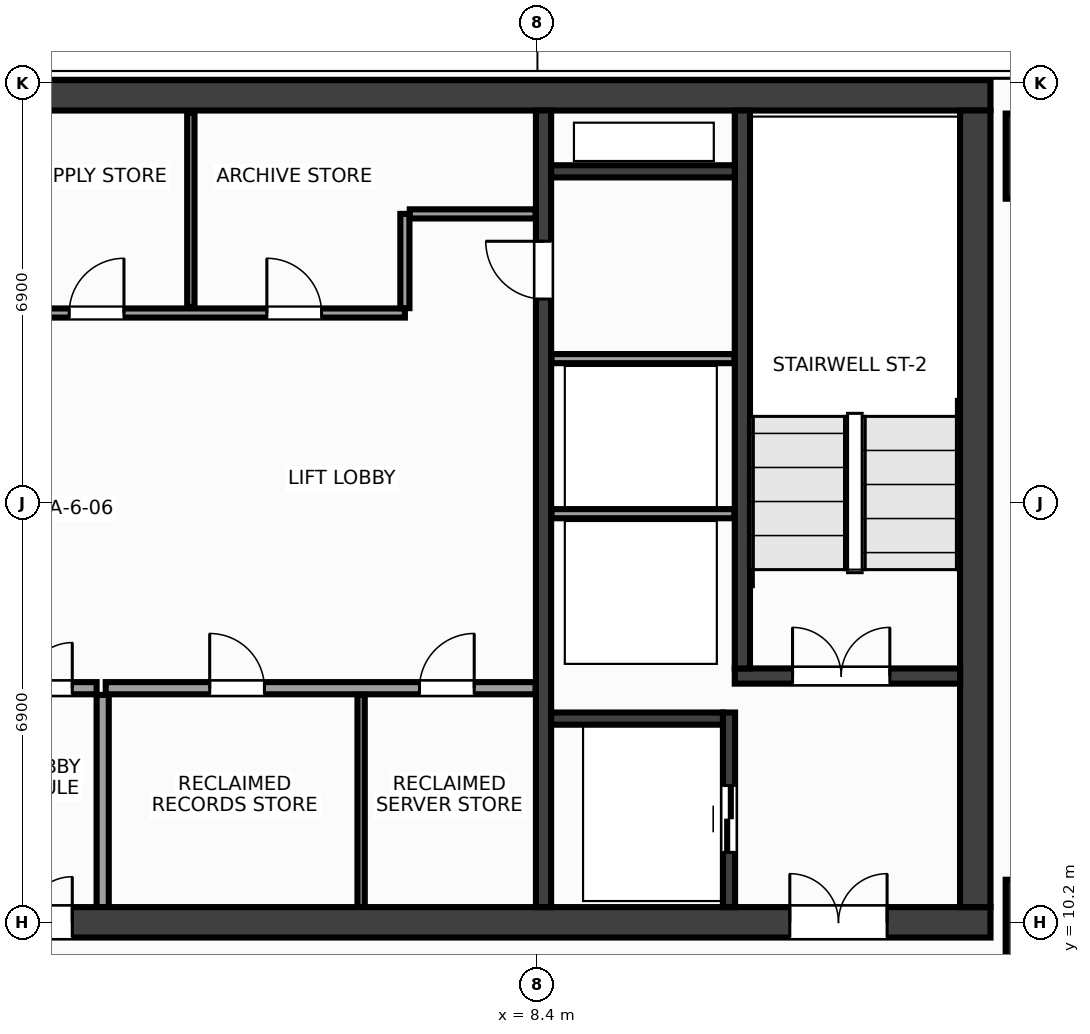
"""IFC4 building model, lengths in metres.
Left out: names, types, materials, properties, quantities, classifications, styles, units other than length and angle.
Written with IfcOpenShell. Run it as: python <this file> out.ifc"""

import sys

from ifc_helpers import new_model, si_unit, direction, frame, frame_2d, origin, origin_2d, place, context, subcontext, project, spatial, rectangle, extrude, source, transform, mapped, element, fill, save


model = new_model("IFC4")
c1 = context("Model", 3, precision=1e-05, world=origin(), true_north=direction((0.0, 1.0)))
c2 = subcontext(c1, "Body", "Model", "MODEL_VIEW")
j1 = project(units=[si_unit("LENGTHUNIT", "METRE"), si_unit("PLANEANGLEUNIT", "RADIAN")], contexts=[c1])
p1 = place(None, origin())
s1 = spatial("IfcSite", under=j1, at=p1, CompositionType="ELEMENT")
p2 = place(p1, origin())
s2 = spatial("IfcBuilding", under=s1, at=p2, CompositionType="ELEMENT")
p3 = place(p2, frame((0.0, 0.0, 261.2)))
s3 = spatial("IfcBuildingStorey", under=s2, at=p3, CompositionType="ELEMENT", Elevation=261.2)
m1 = source(origin(), c2, "Body", "SweptSolid", [
    extrude(rectangle(XDim=31.7, YDim=0.5, at=frame_2d((15.85, 0.0))), origin(), (0.0, 0.0, 1.0), 3.6),
])
p4 = place(p3, frame((-15.85, 23.8, 0.0), z_axis=(0.0, 0.0, 1.0), x_axis=(1.0, 0.0, 0.0)))
e1 = element("IfcWall", 1, at=p4, inside=s3, PredefinedType="SHEAR", context=c2, shape_type="MappedRepresentation", body=[
    mapped(m1, transform((0.0, 0.0, 0.0), x_axis=(1.0, 0.0, 0.0), y_axis=(0.0, 1.0, 0.0), z_axis=(0.0, 0.0, 1.0), scale=1.0)),
])
p5 = place(p3, frame((-15.85, 10.2, 0.0), z_axis=(0.0, 0.0, 1.0), x_axis=(1.0, 0.0, 0.0)))
e2 = element("IfcWall", 2, at=p5, inside=s3, PredefinedType="SHEAR", context=c2, shape_type="MappedRepresentation", body=[
    mapped(m1, transform((0.0, 0.0, 0.0), x_axis=(1.0, 0.0, 0.0), y_axis=(0.0, 1.0, 0.0), z_axis=(0.0, 0.0, 1.0), scale=1.0)),
])
p6 = place(p5, frame((1.7, 0.0, 0.0)))
e3 = element("IfcOpeningElement", 3, at=p6, cuts=e2, PredefinedType="OPENING", context=c2, shape_type="SweptSolid", body=[
    extrude(rectangle(XDim=1.6, YDim=2.15, at=frame_2d((0.8, 1.075))), frame((0.0, 0.262, 0.0), z_axis=(0.0, -1.0, 0.0), x_axis=(1.0, 0.0, 0.0)), (0.0, 0.0, 1.0), 0.524),
])
p7 = place(p5, frame((28.4, 0.0, 0.0)))
e4 = element("IfcOpeningElement", 4, at=p7, cuts=e2, PredefinedType="OPENING", context=c2, shape_type="SweptSolid", body=[
    extrude(rectangle(XDim=1.6, YDim=2.15, at=frame_2d((0.8, 1.075))), frame((0.0, 0.262, 0.0), z_axis=(0.0, -1.0, 0.0), x_axis=(1.0, 0.0, 0.0)), (0.0, 0.0, 1.0), 0.524),
])
p8 = place(p5, frame((15.1, 0.0, 0.0)))
e5 = element("IfcOpeningElement", 5, at=p8, cuts=e2, PredefinedType="OPENING", context=c2, shape_type="SweptSolid", body=[
    extrude(rectangle(XDim=1.5, YDim=2.2, at=frame_2d((0.75, 1.1))), frame((0.0, 0.262, 0.0), z_axis=(0.0, -1.0, 0.0), x_axis=(1.0, 0.0, 0.0)), (0.0, 0.0, 1.0), 0.524),
])
m2 = source(origin(), c2, "Body", "SweptSolid", [
    extrude(rectangle(XDim=13.1, YDim=0.5, at=frame_2d((6.55, 0.0))), origin(), (0.0, 0.0, 1.0), 3.6),
])
p9 = place(p3, frame((15.6, 10.45, 0.0), z_axis=(0.0, 0.0, 1.0), x_axis=(0.0, 1.0, 0.0)))
e6 = element("IfcWall", 6, at=p9, inside=s3, PredefinedType="SHEAR", context=c2, shape_type="MappedRepresentation", body=[
    mapped(m2, transform((0.0, 0.0, 0.0), x_axis=(1.0, 0.0, 0.0), y_axis=(0.0, 1.0, 0.0), z_axis=(0.0, 0.0, 1.0), scale=1.0)),
])
m3 = source(origin(), c2, "Body", "SweptSolid", [
    extrude(rectangle(XDim=13.1, YDim=0.25, at=frame_2d((6.55, 0.0))), origin(), (0.0, 0.0, 1.0), 3.6),
])
p10 = place(p3, frame((8.5, 10.45, 0.0), z_axis=(0.0, 0.0, 1.0), x_axis=(0.0, 1.0, 0.0)))
e7 = element("IfcWall", 7, at=p10, inside=s3, PredefinedType="SHEAR", context=c2, shape_type="MappedRepresentation", body=[
    mapped(m3, transform((0.0, 0.0, 0.0), x_axis=(1.0, 0.0, 0.0), y_axis=(0.0, 1.0, 0.0), z_axis=(0.0, 0.0, 1.0), scale=1.0)),
])
p11 = place(p10, frame((10.0, 0.0, 0.0)))
e8 = element("IfcOpeningElement", 8, at=p11, cuts=e7, PredefinedType="OPENING", context=c2, shape_type="SweptSolid", body=[
    extrude(rectangle(XDim=0.95, YDim=2.15, at=frame_2d((0.475, 1.075))), frame((0.0, 0.137, 0.0), z_axis=(0.0, -1.0, 0.0), x_axis=(1.0, 0.0, 0.0)), (0.0, 0.0, 1.0), 0.274),
])
m4 = source(origin(), c2, "Body", "SweptSolid", [
    extrude(rectangle(XDim=3.705, YDim=0.25, at=frame_2d((1.853, 0.0))), origin(), (0.0, 0.0, 1.0), 3.6),
])
p12 = place(p3, frame((11.645, 14.25, 0.0), z_axis=(0.0, 0.0, 1.0), x_axis=(1.0, 0.0, 0.0)))
e9 = element("IfcWall", 9, at=p12, inside=s3, PredefinedType="SHEAR", context=c2, shape_type="MappedRepresentation", body=[
    mapped(m4, transform((0.0, 0.0, 0.0), x_axis=(1.0, 0.0, 0.0), y_axis=(0.0, 1.0, 0.0), z_axis=(0.0, 0.0, 1.0), scale=1.0)),
])
p13 = place(p12, frame((0.95, 0.0, 0.0)))
e10 = element("IfcOpeningElement", 10, at=p13, cuts=e9, PredefinedType="OPENING", context=c2, shape_type="SweptSolid", body=[
    extrude(rectangle(XDim=1.6, YDim=2.15, at=frame_2d((0.8, 1.075))), frame((0.0, 0.137, 0.0), z_axis=(0.0, -1.0, 0.0), x_axis=(1.0, 0.0, 0.0)), (0.0, 0.0, 1.0), 0.274),
])
m5 = source(origin(), c2, "Body", "SweptSolid", [
    extrude(rectangle(XDim=9.175, YDim=0.25, at=frame_2d((4.587, 0.0))), origin(), (0.0, 0.0, 1.0), 3.6),
])
p14 = place(p3, frame((11.77, 14.375, 0.0), z_axis=(0.0, 0.0, 1.0), x_axis=(0.0, 1.0, 0.0)))
e11 = element("IfcWall", 11, at=p14, inside=s3, PredefinedType="SHEAR", context=c2, shape_type="MappedRepresentation", body=[
    mapped(m5, transform((0.0, 0.0, 0.0), x_axis=(1.0, 0.0, 0.0), y_axis=(0.0, 1.0, 0.0), z_axis=(0.0, 0.0, 1.0), scale=1.0)),
])
m6 = source(origin(), c2, "Body", "SweptSolid", [
    extrude(rectangle(XDim=3.2, YDim=0.2, at=frame_2d((1.6, 0.0))), origin(), (0.0, 0.0, 1.0), 3.6),
])
p15 = place(p3, frame((11.55, 10.45, 0.0), z_axis=(0.0, 0.0, 1.0), x_axis=(0.0, 1.0, 0.0)))
e12 = element("IfcWall", 12, at=p15, inside=s3, PredefinedType="SHEAR", context=c2, shape_type="MappedRepresentation", body=[
    mapped(m6, transform((0.0, 0.0, 0.0), x_axis=(1.0, 0.0, 0.0), y_axis=(0.0, 1.0, 0.0), z_axis=(0.0, 0.0, 1.0), scale=1.0)),
])
p16 = place(p15, frame((0.9, 0.0, 0.0)))
e13 = element("IfcOpeningElement", 13, at=p16, cuts=e12, PredefinedType="OPENING", context=c2, shape_type="SweptSolid", body=[
    extrude(rectangle(XDim=1.1, YDim=2.15, at=frame_2d((0.55, 1.075))), frame((0.0, 0.112, 0.0), z_axis=(0.0, -1.0, 0.0), x_axis=(1.0, 0.0, 0.0)), (0.0, 0.0, 1.0), 0.224),
])
m7 = source(origin(), c2, "Body", "SweptSolid", [
    extrude(rectangle(XDim=2.825, YDim=0.2, at=frame_2d((1.413, 0.0))), origin(), (0.0, 0.0, 1.0), 3.6),
])
p17 = place(p3, frame((8.625, 13.55, 0.0), z_axis=(0.0, 0.0, 1.0), x_axis=(1.0, 0.0, 0.0)))
e14 = element("IfcWall", 14, at=p17, inside=s3, PredefinedType="SHEAR", context=c2, shape_type="MappedRepresentation", body=[
    mapped(m7, transform((0.0, 0.0, 0.0), x_axis=(1.0, 0.0, 0.0), y_axis=(0.0, 1.0, 0.0), z_axis=(0.0, 0.0, 1.0), scale=1.0)),
])
m8 = source(origin(), c2, "Body", "SweptSolid", [
    extrude(rectangle(XDim=3.02, YDim=0.2, at=frame_2d((1.51, 0.0))), origin(), (0.0, 0.0, 1.0), 3.6),
])
p18 = place(p3, frame((8.625, 22.55, 0.0), z_axis=(0.0, 0.0, 1.0), x_axis=(1.0, 0.0, 0.0)))
e15 = element("IfcWall", 15, at=p18, inside=s3, PredefinedType="SHEAR", context=c2, shape_type="MappedRepresentation", body=[
    mapped(m8, transform((0.0, 0.0, 0.0), x_axis=(1.0, 0.0, 0.0), y_axis=(0.0, 1.0, 0.0), z_axis=(0.0, 0.0, 1.0), scale=1.0)),
])
m9 = source(origin(), c2, "Body", "SweptSolid", [
    extrude(rectangle(XDim=1.4, YDim=1.4, at=origin_2d()), origin(), (0.0, 0.0, 1.0), 3.6),
])
for number, where, z_axis, x_axis in (
    (16, (16.8, 10.2, 0.0), (0.0, 0.0, 1.0), (1.0, 0.0, 0.0)),
    (17, (16.8, 22.8, 0.0), (0.0, 0.0, 1.0), (1.0, 0.0, 0.0)),
):
    element("IfcColumn", number, at=place(p3, frame(where, z_axis=z_axis, x_axis=x_axis)), inside=s3, PredefinedType="COLUMN", context=c2, shape_type="MappedRepresentation", body=[
        mapped(m9, transform((0.0, 0.0, 0.0), x_axis=(1.0, 0.0, 0.0), y_axis=(0.0, 1.0, 0.0), z_axis=(0.0, 0.0, 1.0), scale=1.0)),
    ])
m10 = source(origin(), c2, "Body", "SweptSolid", [
    extrude(rectangle(XDim=3.01, YDim=0.15, at=frame_2d((1.505, 0.0))), origin(), (0.0, 0.0, 1.0), 3.37),
])
for number, where, z_axis, x_axis in (
    (18, (8.63, 16.92, 0.0), (0.0, 0.0, 1.0), (1.0, 0.0, 0.0)),
    (19, (8.63, 19.47, 0.0), (0.0, 0.0, 1.0), (1.0, 0.0, 0.0)),
):
    element("IfcWall", number, at=place(p3, frame(where, z_axis=z_axis, x_axis=x_axis)), inside=s3, PredefinedType="PARTITIONING", context=c2, shape_type="MappedRepresentation", body=[
        mapped(m10, transform((0.0, 0.0, 0.0), x_axis=(1.0, 0.0, 0.0), y_axis=(0.0, 1.0, 0.0), z_axis=(0.0, 0.0, 1.0), scale=1.0)),
    ])
m11 = source(origin(), c2, "Body", "SweptSolid", [
    extrude(rectangle(XDim=7.07, YDim=0.2, at=frame_2d((3.535, 0.0))), origin(), (0.0, 0.0, 1.0), 3.37),
])
p19 = place(p3, frame((1.3, 14.05, 0.0), z_axis=(0.0, 0.0, 1.0), x_axis=(1.0, 0.0, 0.0)))
e20 = element("IfcWall", 20, at=p19, inside=s3, PredefinedType="PARTITIONING", context=c2, shape_type="MappedRepresentation", body=[
    mapped(m11, transform((0.0, 0.0, 0.0), x_axis=(1.0, 0.0, 0.0), y_axis=(0.0, 1.0, 0.0), z_axis=(0.0, 0.0, 1.0), scale=1.0)),
])
p20 = place(p19, frame((1.71, 0.0, 0.0)))
e21 = element("IfcOpeningElement", 21, at=p20, cuts=e20, PredefinedType="OPENING", context=c2, shape_type="SweptSolid", body=[
    extrude(rectangle(XDim=0.9, YDim=2.15, at=frame_2d((0.45, 1.075))), frame((0.0, 0.112, 0.0), z_axis=(0.0, -1.0, 0.0), x_axis=(1.0, 0.0, 0.0)), (0.0, 0.0, 1.0), 0.224),
])
p21 = place(p19, frame((5.16, 0.0, 0.0)))
e22 = element("IfcOpeningElement", 22, at=p21, cuts=e20, PredefinedType="OPENING", context=c2, shape_type="SweptSolid", body=[
    extrude(rectangle(XDim=0.9, YDim=2.15, at=frame_2d((0.45, 1.075))), frame((0.0, 0.112, 0.0), z_axis=(0.0, -1.0, 0.0), x_axis=(1.0, 0.0, 0.0)), (0.0, 0.0, 1.0), 0.224),
])
m12 = source(origin(), c2, "Body", "SweptSolid", [
    extrude(rectangle(XDim=3.49, YDim=0.2, at=frame_2d((1.745, 0.0))), origin(), (0.0, 0.0, 1.0), 3.37),
])
p22 = place(p3, frame((1.25, 10.45, 0.0), z_axis=(0.0, 0.0, 1.0), x_axis=(0.0, 1.0, 0.0)))
e23 = element("IfcWall", 23, at=p22, inside=s3, PredefinedType="PARTITIONING", context=c2, shape_type="MappedRepresentation", body=[
    mapped(m12, transform((0.0, 0.0, 0.0), x_axis=(1.0, 0.0, 0.0), y_axis=(0.0, 1.0, 0.0), z_axis=(0.0, 0.0, 1.0), scale=1.0)),
])
m13 = source(origin(), c2, "Body", "SweptSolid", [
    extrude(rectangle(XDim=2.3, YDim=0.2, at=frame_2d((1.15, 0.0))), origin(), (0.0, 0.0, 1.0), 3.37),
])
p23 = place(p3, frame((-1.15, 14.05, 0.0), z_axis=(0.0, 0.0, 1.0), x_axis=(1.0, 0.0, 0.0)))
e24 = element("IfcWall", 24, at=p23, inside=s3, PredefinedType="PARTITIONING", context=c2, shape_type="MappedRepresentation", body=[
    mapped(m13, transform((0.0, 0.0, 0.0), x_axis=(1.0, 0.0, 0.0), y_axis=(0.0, 1.0, 0.0), z_axis=(0.0, 0.0, 1.0), scale=1.0)),
])
p24 = place(p23, frame((0.4, 0.0, 0.0)))
e25 = element("IfcOpeningElement", 25, at=p24, cuts=e24, PredefinedType="OPENING", context=c2, shape_type="SweptSolid", body=[
    extrude(rectangle(XDim=1.5, YDim=2.2, at=frame_2d((0.75, 1.1))), frame((0.0, 0.112, 0.0), z_axis=(0.0, -1.0, 0.0), x_axis=(1.0, 0.0, 0.0)), (0.0, 0.0, 1.0), 0.224),
])
m14 = source(origin(), c2, "Body", "SweptSolid", [
    extrude(rectangle(XDim=14.59, YDim=0.15, at=frame_2d((7.295, 0.0))), origin(), (0.0, 0.0, 1.0), 3.37),
])
p25 = place(p3, frame((-8.37, 20.22, 0.0), z_axis=(0.0, 0.0, 1.0), x_axis=(1.0, 0.0, 0.0)))
e26 = element("IfcWall", 26, at=p25, inside=s3, PredefinedType="PARTITIONING", context=c2, shape_type="MappedRepresentation", body=[
    mapped(m14, transform((0.0, 0.0, 0.0), x_axis=(1.0, 0.0, 0.0), y_axis=(0.0, 1.0, 0.0), z_axis=(0.0, 0.0, 1.0), scale=1.0)),
])
p26 = place(p25, frame((0.86, 0.0, 0.0)))
e27 = element("IfcOpeningElement", 27, at=p26, cuts=e26, PredefinedType="OPENING", context=c2, shape_type="SweptSolid", body=[
    extrude(rectangle(XDim=0.9, YDim=2.15, at=frame_2d((0.45, 1.075))), frame((0.0, 0.087, 0.0), z_axis=(0.0, -1.0, 0.0), x_axis=(1.0, 0.0, 0.0)), (0.0, 0.0, 1.0), 0.174),
])
p27 = place(p25, frame((3.47, 0.0, 0.0)))
e28 = element("IfcOpeningElement", 28, at=p27, cuts=e26, PredefinedType="OPENING", context=c2, shape_type="SweptSolid", body=[
    extrude(rectangle(XDim=0.9, YDim=2.15, at=frame_2d((0.45, 1.075))), frame((0.0, 0.087, 0.0), z_axis=(0.0, -1.0, 0.0), x_axis=(1.0, 0.0, 0.0)), (0.0, 0.0, 1.0), 0.174),
])
p28 = place(p25, frame((6.17, 0.0, 0.0)))
e29 = element("IfcOpeningElement", 29, at=p28, cuts=e26, PredefinedType="OPENING", context=c2, shape_type="SweptSolid", body=[
    extrude(rectangle(XDim=0.9, YDim=2.15, at=frame_2d((0.45, 1.075))), frame((0.0, 0.087, 0.0), z_axis=(0.0, -1.0, 0.0), x_axis=(1.0, 0.0, 0.0)), (0.0, 0.0, 1.0), 0.174),
])
p29 = place(p25, frame((9.07, 0.0, 0.0)))
e30 = element("IfcOpeningElement", 30, at=p29, cuts=e26, PredefinedType="OPENING", context=c2, shape_type="SweptSolid", body=[
    extrude(rectangle(XDim=0.9, YDim=2.15, at=frame_2d((0.45, 1.075))), frame((0.0, 0.087, 0.0), z_axis=(0.0, -1.0, 0.0), x_axis=(1.0, 0.0, 0.0)), (0.0, 0.0, 1.0), 0.174),
])
p30 = place(p25, frame((12.32, 0.0, 0.0)))
e31 = element("IfcOpeningElement", 31, at=p30, cuts=e26, PredefinedType="OPENING", context=c2, shape_type="SweptSolid", body=[
    extrude(rectangle(XDim=0.9, YDim=2.15, at=frame_2d((0.45, 1.075))), frame((0.0, 0.087, 0.0), z_axis=(0.0, -1.0, 0.0), x_axis=(1.0, 0.0, 0.0)), (0.0, 0.0, 1.0), 0.174),
])
m15 = source(origin(), c2, "Body", "SweptSolid", [
    extrude(rectangle(XDim=1.55, YDim=0.15, at=frame_2d((0.775, 0.0))), origin(), (0.0, 0.0, 1.0), 3.37),
])
p31 = place(p3, frame((6.22, 20.3, 0.0), z_axis=(0.0, 0.0, 1.0), x_axis=(0.0, 1.0, 0.0)))
e32 = element("IfcWall", 32, at=p31, inside=s3, PredefinedType="PARTITIONING", context=c2, shape_type="MappedRepresentation", body=[
    mapped(m15, transform((0.0, 0.0, 0.0), x_axis=(1.0, 0.0, 0.0), y_axis=(0.0, 1.0, 0.0), z_axis=(0.0, 0.0, 1.0), scale=1.0)),
])
m16 = source(origin(), c2, "Body", "SweptSolid", [
    extrude(rectangle(XDim=2.07, YDim=0.15, at=frame_2d((1.035, 0.0))), origin(), (0.0, 0.0, 1.0), 3.37),
])
p32 = place(p3, frame((6.3, 21.85, 0.0), z_axis=(0.0, 0.0, 1.0), x_axis=(1.0, 0.0, 0.0)))
e33 = element("IfcWall", 33, at=p32, inside=s3, PredefinedType="PARTITIONING", context=c2, shape_type="MappedRepresentation", body=[
    mapped(m16, transform((0.0, 0.0, 0.0), x_axis=(1.0, 0.0, 0.0), y_axis=(0.0, 1.0, 0.0), z_axis=(0.0, 0.0, 1.0), scale=1.0)),
])
m17 = source(origin(), c2, "Body", "SweptSolid", [
    extrude(rectangle(XDim=3.49, YDim=0.12, at=frame_2d((1.745, 0.0))), origin(), (0.0, 0.0, 1.0), 3.37),
])
p33 = place(p3, frame((5.5, 10.45, 0.0), z_axis=(0.0, 0.0, 1.0), x_axis=(0.0, 1.0, 0.0)))
e34 = element("IfcWall", 34, at=p33, inside=s3, PredefinedType="PARTITIONING", context=c2, shape_type="MappedRepresentation", body=[
    mapped(m17, transform((0.0, 0.0, 0.0), x_axis=(1.0, 0.0, 0.0), y_axis=(0.0, 1.0, 0.0), z_axis=(0.0, 0.0, 1.0), scale=1.0)),
])
m18 = source(origin(), c2, "Body", "SweptSolid", [
    extrude(rectangle(XDim=3.19, YDim=0.12, at=frame_2d((1.595, 0.0))), origin(), (0.0, 0.0, 1.0), 3.37),
])
p34 = place(p3, frame((2.7, 20.32, 0.0), z_axis=(0.0, 0.0, 1.0), x_axis=(0.0, 1.0, 0.0)))
e35 = element("IfcWall", 35, at=p34, inside=s3, PredefinedType="PARTITIONING", context=c2, shape_type="MappedRepresentation", body=[
    mapped(m18, transform((0.0, 0.0, 0.0), x_axis=(1.0, 0.0, 0.0), y_axis=(0.0, 1.0, 0.0), z_axis=(0.0, 0.0, 1.0), scale=1.0)),
])
m19 = source(origin(), c2, "Body", "SweptSolid", [
    extrude(rectangle(XDim=1.6, YDim=2.15, at=frame_2d((0.8, 1.075))), frame((0.0, 0.025, 0.0), z_axis=(0.0, -1.0, 0.0), x_axis=(1.0, 0.0, 0.0)), (0.0, 0.0, 1.0), 0.05),
])
p35 = place(p13, origin())
e36 = element("IfcDoor", 36, at=p35, inside=s3, OperationType="DOUBLE_DOOR_SINGLE_SWING", PredefinedType="DOOR", context=c2, shape_type="MappedRepresentation", body=[
    mapped(m19, transform((0.0, 0.0, 0.0), x_axis=(1.0, 0.0, 0.0), y_axis=(0.0, 1.0, 0.0), z_axis=(0.0, 0.0, 1.0), scale=1.0)),
])
fill(e10, e36)
p36 = place(p7, origin())
e37 = element("IfcDoor", 37, at=p36, inside=s3, OperationType="DOUBLE_DOOR_SINGLE_SWING", PredefinedType="DOOR", context=c2, shape_type="MappedRepresentation", body=[
    mapped(m19, transform((0.0, 0.0, 0.0), x_axis=(1.0, 0.0, 0.0), y_axis=(0.0, 1.0, 0.0), z_axis=(0.0, 0.0, 1.0), scale=1.0)),
])
fill(e4, e37)
m20 = source(origin(), c2, "Body", "SweptSolid", [
    extrude(rectangle(XDim=1.1, YDim=2.15, at=frame_2d((0.55, 1.075))), frame((0.0, 0.025, 0.0), z_axis=(0.0, -1.0, 0.0), x_axis=(1.0, 0.0, 0.0)), (0.0, 0.0, 1.0), 0.05),
])
p37 = place(p16, origin())
e38 = element("IfcDoor", 38, at=p37, inside=s3, OperationType="DOUBLE_DOOR_SLIDING", PredefinedType="DOOR", context=c2, shape_type="MappedRepresentation", body=[
    mapped(m20, transform((0.0, 0.0, 0.0), x_axis=(1.0, 0.0, 0.0), y_axis=(0.0, 1.0, 0.0), z_axis=(0.0, 0.0, 1.0), scale=1.0)),
])
fill(e13, e38)
m21 = source(origin(), c2, "Body", "SweptSolid", [
    extrude(rectangle(XDim=0.95, YDim=2.15, at=frame_2d((0.475, 1.075))), frame((0.0, 0.025, 0.0), z_axis=(0.0, -1.0, 0.0), x_axis=(1.0, 0.0, 0.0)), (0.0, 0.0, 1.0), 0.05),
])
p38 = place(p11, origin())
e39 = element("IfcDoor", 39, at=p38, inside=s3, OperationType="SINGLE_SWING_RIGHT", PredefinedType="DOOR", context=c2, shape_type="MappedRepresentation", body=[
    mapped(m21, transform((0.0, 0.0, 0.0), x_axis=(1.0, 0.0, 0.0), y_axis=(0.0, 1.0, 0.0), z_axis=(0.0, 0.0, 1.0), scale=1.0)),
])
fill(e8, e39)
m22 = source(origin(), c2, "Body", "SweptSolid", [
    extrude(rectangle(XDim=0.9, YDim=2.15, at=frame_2d((0.45, 1.075))), frame((0.0, 0.025, 0.0), z_axis=(0.0, -1.0, 0.0), x_axis=(1.0, 0.0, 0.0)), (0.0, 0.0, 1.0), 0.05),
])
p39 = place(p20, origin())
e40 = element("IfcDoor", 40, at=p39, inside=s3, OperationType="SINGLE_SWING_LEFT", PredefinedType="DOOR", context=c2, shape_type="MappedRepresentation", body=[
    mapped(m22, transform((0.0, 0.0, 0.0), x_axis=(1.0, 0.0, 0.0), y_axis=(0.0, 1.0, 0.0), z_axis=(0.0, 0.0, 1.0), scale=1.0)),
])
fill(e21, e40)
p40 = place(p21, origin())
e41 = element("IfcDoor", 41, at=p40, inside=s3, OperationType="SINGLE_SWING_RIGHT", PredefinedType="DOOR", context=c2, shape_type="MappedRepresentation", body=[
    mapped(m22, transform((0.0, 0.0, 0.0), x_axis=(1.0, 0.0, 0.0), y_axis=(0.0, 1.0, 0.0), z_axis=(0.0, 0.0, 1.0), scale=1.0)),
])
fill(e22, e41)
m23 = source(origin(), c2, "Body", "SweptSolid", [
    extrude(rectangle(XDim=1.5, YDim=2.2, at=frame_2d((0.75, 1.1))), frame((0.0, 0.025, 0.0), z_axis=(0.0, -1.0, 0.0), x_axis=(1.0, 0.0, 0.0)), (0.0, 0.0, 1.0), 0.05),
])
p41 = place(p24, origin())
e42 = element("IfcDoor", 42, at=p41, inside=s3, OperationType="DOUBLE_DOOR_SINGLE_SWING", PredefinedType="DOOR", context=c2, shape_type="MappedRepresentation", body=[
    mapped(m23, transform((0.0, 0.0, 0.0), x_axis=(1.0, 0.0, 0.0), y_axis=(0.0, 1.0, 0.0), z_axis=(0.0, 0.0, 1.0), scale=1.0)),
])
fill(e25, e42)
p42 = place(p8, origin())
e43 = element("IfcDoor", 43, at=p42, inside=s3, OperationType="DOUBLE_DOOR_SINGLE_SWING", PredefinedType="DOOR", context=c2, shape_type="MappedRepresentation", body=[
    mapped(m23, transform((0.0, 0.0, 0.0), x_axis=(1.0, 0.0, 0.0), y_axis=(0.0, 1.0, 0.0), z_axis=(0.0, 0.0, 1.0), scale=1.0)),
])
fill(e5, e43)
p43 = place(p29, origin())
e44 = element("IfcDoor", 44, at=p43, inside=s3, OperationType="SINGLE_SWING_RIGHT", PredefinedType="DOOR", context=c2, shape_type="MappedRepresentation", body=[
    mapped(m22, transform((0.0, 0.0, 0.0), x_axis=(1.0, 0.0, 0.0), y_axis=(0.0, 1.0, 0.0), z_axis=(0.0, 0.0, 1.0), scale=1.0)),
])
fill(e30, e44)
p44 = place(p30, origin())
e45 = element("IfcDoor", 45, at=p44, inside=s3, OperationType="SINGLE_SWING_LEFT", PredefinedType="DOOR", context=c2, shape_type="MappedRepresentation", body=[
    mapped(m22, transform((0.0, 0.0, 0.0), x_axis=(1.0, 0.0, 0.0), y_axis=(0.0, 1.0, 0.0), z_axis=(0.0, 0.0, 1.0), scale=1.0)),
])
fill(e31, e45)
save(model, sys.argv[1])
